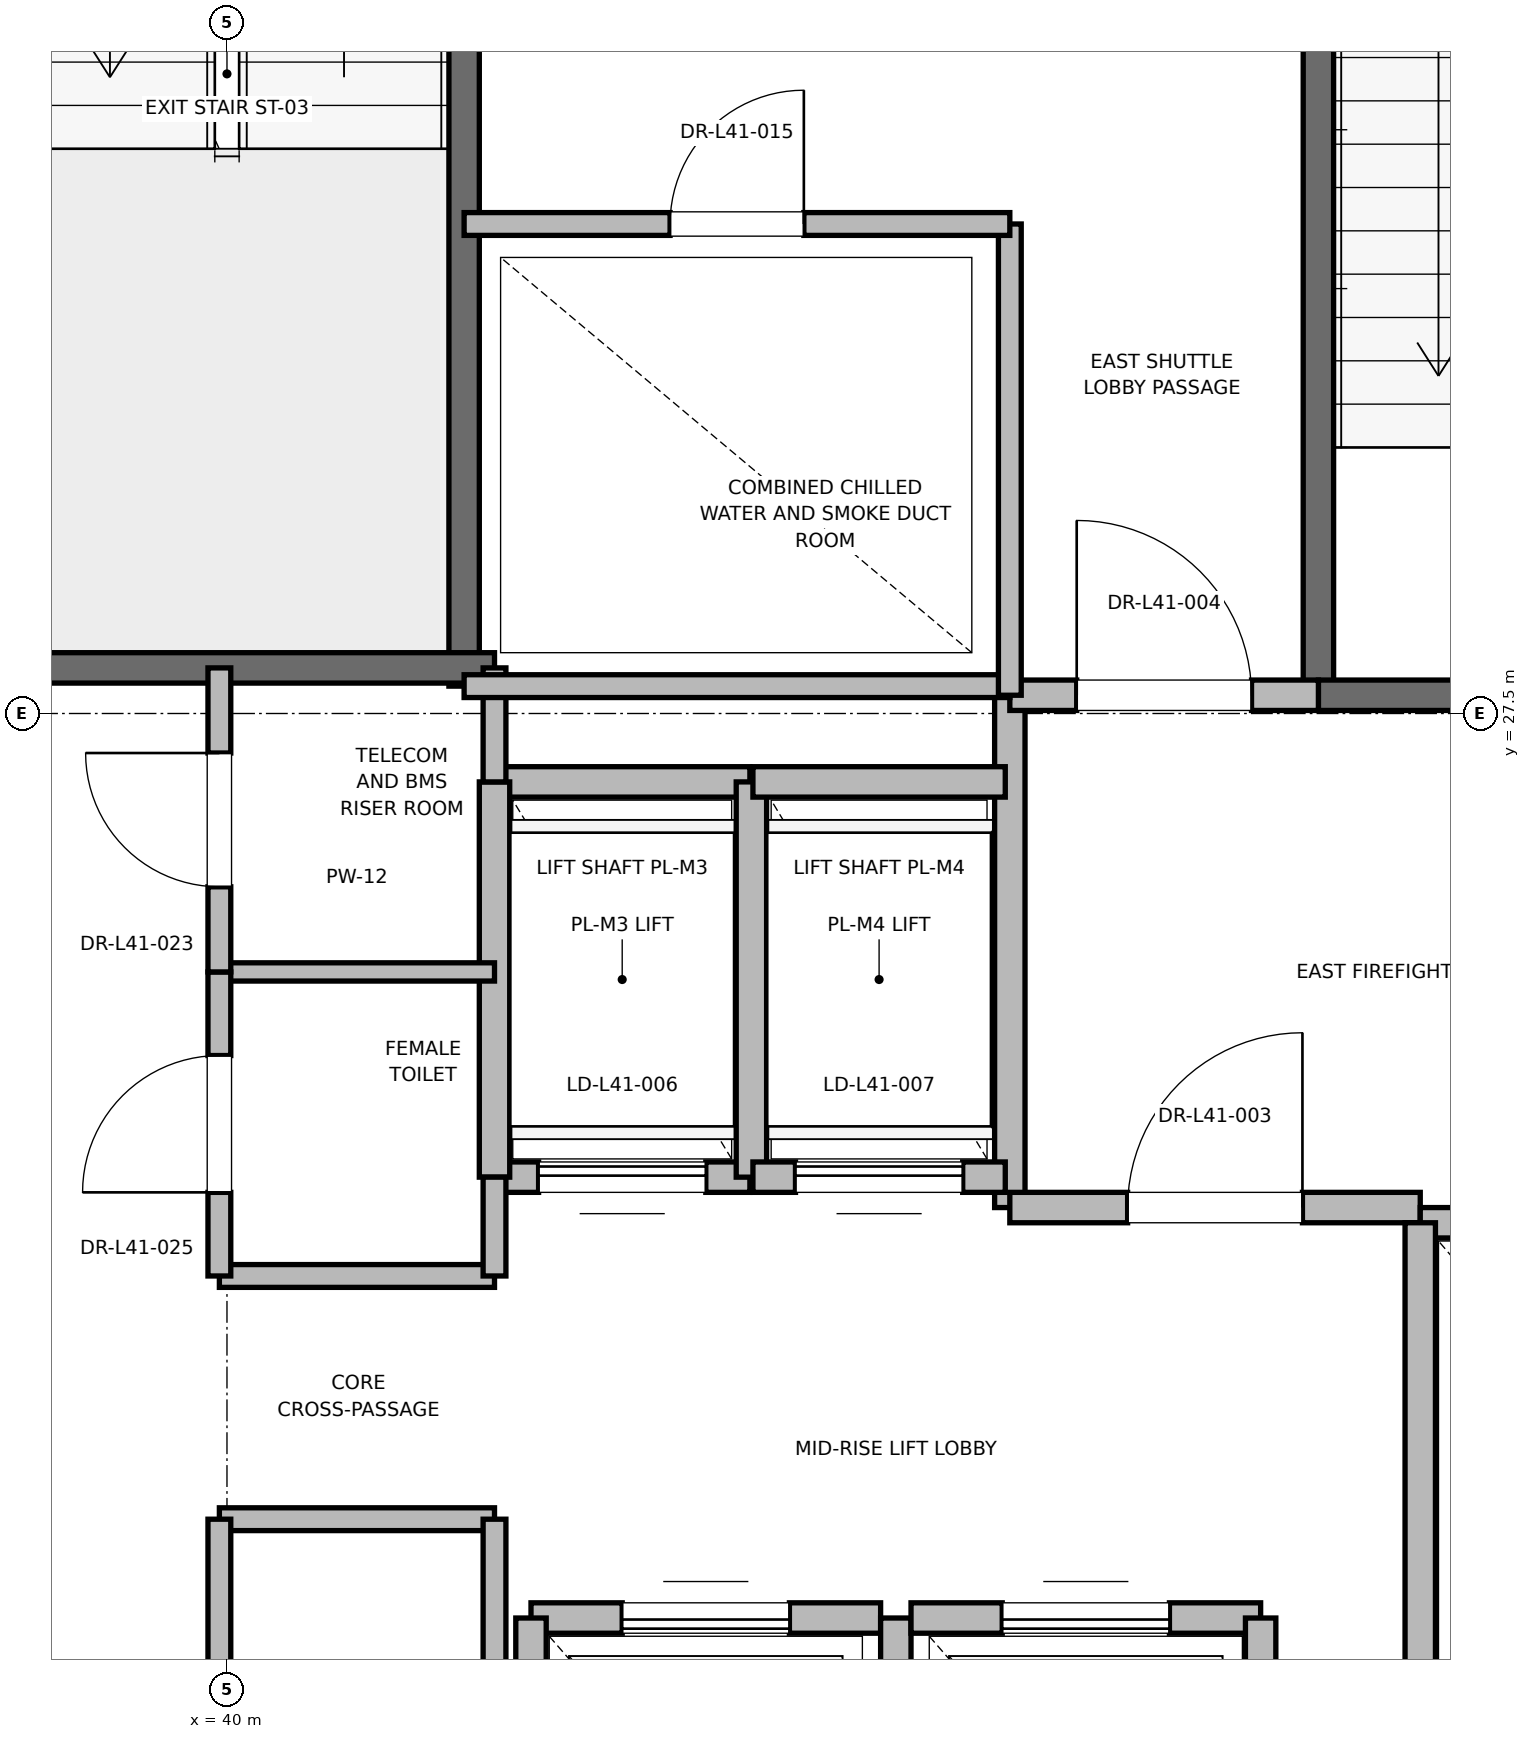
"""IFC4 building model, lengths in metres.
Left out: names, types, materials, properties, quantities, classifications, styles, units other than length and angle.
Written with IfcOpenShell. Run it as: python <this file> out.ifc"""

import sys

from ifc_helpers import new_model, si_unit, direction, frame, frame_2d, origin, place, context, subcontext, project, spatial, rectangle, extrude, element, fill, save


model = new_model("IFC4")
c1 = context("Model", 3, precision=1e-05, world=origin(), true_north=direction((0.0, 1.0)))
c2 = subcontext(c1, "Body", "Model", "MODEL_VIEW")
j1 = project(units=[si_unit("LENGTHUNIT", "METRE"), si_unit("PLANEANGLEUNIT", "RADIAN")], contexts=[c1])
p1 = place(None, origin())
s1 = spatial("IfcSite", under=j1, at=p1, CompositionType="ELEMENT")
p2 = place(p1, origin())
s2 = spatial("IfcBuilding", under=s1, at=p2, CompositionType="ELEMENT")
p3 = place(p2, frame((0.0, 0.0, 176.4)))
s3 = spatial("IfcBuildingStorey", under=s2, at=p3, CompositionType="ELEMENT", Elevation=176.4)
p4 = place(p3, frame((47.18, 27.62, 0.0), z_axis=(0.0, 0.0, 1.0), x_axis=(0.0, 1.0, 0.0)))
e1 = element("IfcWall", 1, at=p4, inside=s3, PredefinedType="SOLIDWALL", context=c2, shape_type="SweptSolid", body=[
    extrude(rectangle(XDim=8.18, YDim=0.2, at=frame_2d((4.09, 0.0))), origin(), (0.0, 0.0, 1.0), 3.775),
])
p5 = place(p3, frame((47.18, 27.62, 0.0), z_axis=(0.0, 0.0, 1.0), x_axis=(1.0, 0.0, 0.0)))
e2 = element("IfcWall", 2, at=p5, inside=s3, PredefinedType="SOLIDWALL", context=c2, shape_type="SweptSolid", body=[
    extrude(rectangle(XDim=3.12, YDim=0.2, at=frame_2d((1.56, 0.0))), origin(), (0.0, 0.0, 1.0), 3.775),
])
p6 = place(p5, frame((1.01, 0.0, 0.0)))
e3 = element("IfcOpeningElement", 3, at=p6, cuts=e2, PredefinedType="OPENING", context=c2, shape_type="SweptSolid", body=[
    extrude(rectangle(XDim=1.1, YDim=2.15, at=frame_2d((0.55, 1.075))), frame((0.0, 0.1, 0.0), z_axis=(0.0, -1.0, 0.0), x_axis=(1.0, 0.0, 0.0)), (0.0, 0.0, 1.0), 0.2),
])
p7 = place(p3, frame((41.56, 27.68, 0.0), z_axis=(0.0, 0.0, 1.0), x_axis=(0.0, 1.0, 0.0)))
e4 = element("IfcWall", 4, at=p7, inside=s3, PredefinedType="SOLIDWALL", context=c2, shape_type="SweptSolid", body=[
    extrude(rectangle(XDim=8.57, YDim=0.2, at=frame_2d((4.285, 0.0))), origin(), (0.0, 0.0, 1.0), 3.775),
])
p8 = place(p3, frame((38.44, 27.8, 0.0), z_axis=(0.0, 0.0, 1.0), x_axis=(1.0, 0.0, 0.0)))
e5 = element("IfcWall", 5, at=p8, inside=s3, PredefinedType="SOLIDWALL", context=c2, shape_type="SweptSolid", body=[
    extrude(rectangle(XDim=3.32, YDim=0.2, at=frame_2d((1.66, 0.0))), origin(), (0.0, 0.0, 1.0), 3.775),
])
p9 = place(p3, frame((45.15, 24.25, 0.0), z_axis=(0.0, 0.0, 1.0), x_axis=(0.0, 1.0, 0.0)))
e6 = element("IfcWall", 6, at=p9, inside=s3, PredefinedType="PARTITIONING", context=c2, shape_type="SweptSolid", body=[
    extrude(rectangle(XDim=3.37, YDim=0.2, at=frame_2d((1.685, 0.0))), origin(), (0.0, 0.0, 1.0), 3.775),
])
p10 = place(p3, frame((45.15, 24.25, 0.0), z_axis=(0.0, 0.0, 1.0), x_axis=(1.0, 0.0, 0.0)))
e7 = element("IfcWall", 7, at=p10, inside=s3, PredefinedType="PARTITIONING", context=c2, shape_type="SweptSolid", body=[
    extrude(rectangle(XDim=2.7, YDim=0.2, at=frame_2d((1.35, 0.0))), origin(), (0.0, 0.0, 1.0), 3.775),
])
p11 = place(p10, frame((0.775, 0.0, 0.0)))
e8 = element("IfcOpeningElement", 8, at=p11, cuts=e7, PredefinedType="OPENING", context=c2, shape_type="SweptSolid", body=[
    extrude(rectangle(XDim=1.15, YDim=2.2, at=frame_2d((0.575, 1.1))), frame((0.0, 0.1, 0.0), z_axis=(0.0, -1.0, 0.0), x_axis=(1.0, 0.0, 0.0)), (0.0, 0.0, 1.0), 0.2),
])
p12 = place(p3, frame((45.15, 27.62, 0.0), z_axis=(0.0, 0.0, 1.0), x_axis=(1.0, 0.0, 0.0)))
e9 = element("IfcWall", 9, at=p12, inside=s3, PredefinedType="PARTITIONING", context=c2, shape_type="SweptSolid", body=[
    extrude(rectangle(XDim=2.03, YDim=0.2, at=frame_2d((1.015, 0.0))), origin(), (0.0, 0.0, 1.0), 3.775),
])
p13 = place(p12, frame((0.44, 0.0, 0.0)))
e10 = element("IfcOpeningElement", 10, at=p13, cuts=e9, PredefinedType="OPENING", context=c2, shape_type="SweptSolid", body=[
    extrude(rectangle(XDim=1.15, YDim=2.2, at=frame_2d((0.575, 1.1))), frame((0.0, 0.1, 0.0), z_axis=(0.0, -1.0, 0.0), x_axis=(1.0, 0.0, 0.0)), (0.0, 0.0, 1.0), 0.2),
])
p14 = place(p3, frame((50.45, 24.15, 0.0), z_axis=(0.0, 0.0, 1.0), x_axis=(-1.0, 0.0, 0.0)))
e11 = element("IfcWall", 11, at=p14, inside=s3, PredefinedType="SOLIDWALL", context=c2, shape_type="SweptSolid", body=[
    extrude(rectangle(XDim=2.6, YDim=0.2, at=frame_2d((1.3, 0.0))), origin(), (0.0, 0.0, 1.0), 2.755),
])
p15 = place(p14, frame((0.75, 0.0, 0.0)))
e12 = element("IfcOpeningElement", 12, at=p15, cuts=e11, PredefinedType="OPENING", context=c2, shape_type="SweptSolid", body=[
    extrude(rectangle(XDim=1.1, YDim=2.2, at=frame_2d((0.55, 1.1))), frame((0.0, 0.1, 0.0), z_axis=(0.0, -1.0, 0.0), x_axis=(1.0, 0.0, 0.0)), (0.0, 0.0, 1.0), 0.2),
])
p16 = place(p3, frame((47.85, 24.15, 0.0), z_axis=(0.0, 0.0, 1.0), x_axis=(0.0, -1.0, 0.0)))
e13 = element("IfcWall", 13, at=p16, inside=s3, PredefinedType="SOLIDWALL", context=c2, shape_type="SweptSolid", body=[
    extrude(rectangle(XDim=3.0, YDim=0.2, at=frame_2d((1.5, 0.0))), origin(), (0.0, 0.0, 1.0), 3.775),
])
p17 = place(p3, frame((44.3, 21.55, 0.0), z_axis=(0.0, 0.0, 1.0), x_axis=(-1.0, 0.0, 0.0)))
e14 = element("IfcWall", 14, at=p17, inside=s3, PredefinedType="SOLIDWALL", context=c2, shape_type="SweptSolid", body=[
    extrude(rectangle(XDim=2.3, YDim=0.2, at=frame_2d((1.15, 0.0))), origin(), (0.0, 0.0, 1.0), 3.775),
])
p18 = place(p17, frame((0.6, 0.0, 0.0)))
e15 = element("IfcOpeningElement", 15, at=p18, cuts=e14, PredefinedType="OPENING", context=c2, shape_type="SweptSolid", body=[
    extrude(rectangle(XDim=1.1, YDim=2.2, at=frame_2d((0.55, 1.1))), frame((0.0, 0.1, 0.0), z_axis=(0.0, -1.0, 0.0), x_axis=(1.0, 0.0, 0.0)), (0.0, 0.0, 1.0), 0.2),
])
p19 = place(p3, frame((42.0, 21.55, 0.0), z_axis=(0.0, 0.0, 1.0), x_axis=(0.0, -1.0, 0.0)))
e16 = element("IfcWall", 16, at=p19, inside=s3, PredefinedType="SOLIDWALL", context=c2, shape_type="SweptSolid", body=[
    extrude(rectangle(XDim=2.6, YDim=0.2, at=frame_2d((1.3, 0.0))), origin(), (0.0, 0.0, 1.0), 2.755),
])
p20 = place(p3, frame((44.4, 18.95, 0.0), z_axis=(0.0, 0.0, 1.0), x_axis=(0.0, 1.0, 0.0)))
e17 = element("IfcWall", 17, at=p20, inside=s3, PredefinedType="SOLIDWALL", context=c2, shape_type="SweptSolid", body=[
    extrude(rectangle(XDim=2.6, YDim=0.2, at=frame_2d((1.3, 0.0))), origin(), (0.0, 0.0, 1.0), 3.775),
])
p21 = place(p3, frame((46.8, 21.55, 0.0), z_axis=(0.0, 0.0, 1.0), x_axis=(-1.0, 0.0, 0.0)))
e18 = element("IfcWall", 18, at=p21, inside=s3, PredefinedType="SOLIDWALL", context=c2, shape_type="SweptSolid", body=[
    extrude(rectangle(XDim=2.3, YDim=0.2, at=frame_2d((1.15, 0.0))), origin(), (0.0, 0.0, 1.0), 3.775),
])
p22 = place(p21, frame((0.6, 0.0, 0.0)))
e19 = element("IfcOpeningElement", 19, at=p22, cuts=e18, PredefinedType="OPENING", context=c2, shape_type="SweptSolid", body=[
    extrude(rectangle(XDim=1.1, YDim=2.2, at=frame_2d((0.55, 1.1))), frame((0.0, 0.1, 0.0), z_axis=(0.0, -1.0, 0.0), x_axis=(1.0, 0.0, 0.0)), (0.0, 0.0, 1.0), 0.2),
])
p23 = place(p3, frame((46.8, 18.95, 0.0), z_axis=(0.0, 0.0, 1.0), x_axis=(0.0, 1.0, 0.0)))
e20 = element("IfcWall", 20, at=p23, inside=s3, PredefinedType="SOLIDWALL", context=c2, shape_type="SweptSolid", body=[
    extrude(rectangle(XDim=2.6, YDim=0.2, at=frame_2d((1.3, 0.0))), origin(), (0.0, 0.0, 1.0), 3.775),
])
p24 = place(p3, frame((41.76, 24.45, 0.0), z_axis=(0.0, 0.0, 1.0), x_axis=(1.0, 0.0, 0.0)))
e21 = element("IfcWall", 21, at=p24, inside=s3, PredefinedType="SOLIDWALL", context=c2, shape_type="SweptSolid", body=[
    extrude(rectangle(XDim=1.68, YDim=0.2, at=frame_2d((0.84, 0.0))), origin(), (0.0, 0.0, 1.0), 3.775),
])
p25 = place(p24, frame((0.29, 0.0, 0.0)))
e22 = element("IfcOpeningElement", 22, at=p25, cuts=e21, PredefinedType="OPENING", context=c2, shape_type="SweptSolid", body=[
    extrude(rectangle(XDim=1.1, YDim=2.2, at=frame_2d((0.55, 1.1))), frame((0.0, 0.1, 0.0), z_axis=(0.0, -1.0, 0.0), x_axis=(1.0, 0.0, 0.0)), (0.0, 0.0, 1.0), 0.2),
])
p26 = place(p3, frame((43.44, 27.05, 0.0), z_axis=(0.0, 0.0, 1.0), x_axis=(-1.0, 0.0, 0.0)))
e23 = element("IfcWall", 23, at=p26, inside=s3, PredefinedType="SOLIDWALL", context=c2, shape_type="SweptSolid", body=[
    extrude(rectangle(XDim=1.68, YDim=0.2, at=frame_2d((0.84, 0.0))), origin(), (0.0, 0.0, 1.0), 3.775),
])
for number, where, z_axis, x_axis in (
    (24, (41.76, 27.05, 0.0), (0.0, 0.0, 1.0), (0.0, -1.0, 0.0)),
    (25, (43.45, 24.45, 0.0), (0.0, 0.0, 1.0), (0.0, 1.0, 0.0)),
):
    element("IfcWall", number, at=place(p3, frame(where, z_axis=z_axis, x_axis=x_axis)), inside=s3, PredefinedType="SOLIDWALL", context=c2, shape_type="SweptSolid", body=[
        extrude(rectangle(XDim=2.6, YDim=0.2, at=frame_2d((1.3, 0.0))), origin(), (0.0, 0.0, 1.0), 3.775),
    ])
p27 = place(p3, frame((43.46, 24.45, 0.0), z_axis=(0.0, 0.0, 1.0), x_axis=(1.0, 0.0, 0.0)))
e26 = element("IfcWall", 26, at=p27, inside=s3, PredefinedType="SOLIDWALL", context=c2, shape_type="SweptSolid", body=[
    extrude(rectangle(XDim=1.66, YDim=0.2, at=frame_2d((0.83, 0.0))), origin(), (0.0, 0.0, 1.0), 3.775),
])
p28 = place(p27, frame((0.28, 0.0, 0.0)))
e27 = element("IfcOpeningElement", 27, at=p28, cuts=e26, PredefinedType="OPENING", context=c2, shape_type="SweptSolid", body=[
    extrude(rectangle(XDim=1.1, YDim=2.2, at=frame_2d((0.55, 1.1))), frame((0.0, 0.1, 0.0), z_axis=(0.0, -1.0, 0.0), x_axis=(1.0, 0.0, 0.0)), (0.0, 0.0, 1.0), 0.2),
])
p29 = place(p3, frame((45.12, 27.05, 0.0), z_axis=(0.0, 0.0, 1.0), x_axis=(-1.0, 0.0, 0.0)))
e28 = element("IfcWall", 28, at=p29, inside=s3, PredefinedType="SOLIDWALL", context=c2, shape_type="SweptSolid", body=[
    extrude(rectangle(XDim=1.66, YDim=0.2, at=frame_2d((0.83, 0.0))), origin(), (0.0, 0.0, 1.0), 3.775),
])
for number, where, z_axis, x_axis in (
    (29, (39.95, 22.2, 0.0), (0.0, 0.0, 1.0), (1.0, 0.0, 0.0)),
    (30, (39.95, 23.8, 0.0), (0.0, 0.0, 1.0), (1.0, 0.0, 0.0)),
):
    element("IfcWall", number, at=place(p3, frame(where, z_axis=z_axis, x_axis=x_axis)), inside=s3, PredefinedType="PARTITIONING", context=c2, shape_type="SweptSolid", body=[
        extrude(rectangle(XDim=1.81, YDim=0.15, at=frame_2d((0.905, 0.0))), origin(), (0.0, 0.0, 1.0), 2.85),
    ])
p30 = place(p3, frame((39.95, 25.8, 0.0), z_axis=(0.0, 0.0, 1.0), x_axis=(1.0, 0.0, 0.0)))
e31 = element("IfcWall", 31, at=p30, inside=s3, PredefinedType="PARTITIONING", context=c2, shape_type="SweptSolid", body=[
    extrude(rectangle(XDim=1.81, YDim=0.12, at=frame_2d((0.905, 0.0))), origin(), (0.0, 0.0, 1.0), 2.85),
])
p31 = place(p3, frame((41.76, 18.6, 0.0), z_axis=(0.0, 0.0, 1.0), x_axis=(0.0, 1.0, 0.0)))
e32 = element("IfcWall", 32, at=p31, inside=s3, PredefinedType="PARTITIONING", context=c2, shape_type="SweptSolid", body=[
    extrude(rectangle(XDim=3.6, YDim=0.15, at=frame_2d((1.8, 0.0))), origin(), (0.0, 0.0, 1.0), 2.755),
])
p32 = place(p3, frame((41.76, 23.8, 0.0), z_axis=(0.0, 0.0, 1.0), x_axis=(0.0, 1.0, 0.0)))
e33 = element("IfcWall", 33, at=p32, inside=s3, PredefinedType="PARTITIONING", context=c2, shape_type="SweptSolid", body=[
    extrude(rectangle(XDim=0.65, YDim=0.15, at=frame_2d((0.325, 0.0))), origin(), (0.0, 0.0, 1.0), 2.85),
])
p33 = place(p3, frame((41.76, 27.05, 0.0), z_axis=(0.0, 0.0, 1.0), x_axis=(0.0, 1.0, 0.0)))
e34 = element("IfcWall", 34, at=p33, inside=s3, PredefinedType="PARTITIONING", context=c2, shape_type="SweptSolid", body=[
    extrude(rectangle(XDim=0.75, YDim=0.15, at=frame_2d((0.375, 0.0))), origin(), (0.0, 0.0, 1.0), 2.85),
])
p34 = place(p3, frame((39.95, 19.2, 0.0), z_axis=(0.0, 0.0, 1.0), x_axis=(0.0, 1.0, 0.0)))
e35 = element("IfcWall", 35, at=p34, inside=s3, PredefinedType="PARTITIONING", context=c2, shape_type="SweptSolid", body=[
    extrude(rectangle(XDim=3.0, YDim=0.15, at=frame_2d((1.5, 0.0))), origin(), (0.0, 0.0, 1.0), 2.85),
])
p35 = place(p34, frame((1.05, 0.0, 0.0)))
e36 = element("IfcOpeningElement", 36, at=p35, cuts=e35, PredefinedType="OPENING", context=c2, shape_type="SweptSolid", body=[
    extrude(rectangle(XDim=0.9, YDim=2.1, at=frame_2d((0.45, 1.05))), frame((0.0, 0.075, 0.0), z_axis=(0.0, -1.0, 0.0), x_axis=(1.0, 0.0, 0.0)), (0.0, 0.0, 1.0), 0.15),
])
p36 = place(p3, frame((39.95, 23.8, 0.0), z_axis=(0.0, 0.0, 1.0), x_axis=(0.0, 1.0, 0.0)))
e37 = element("IfcWall", 37, at=p36, inside=s3, PredefinedType="PARTITIONING", context=c2, shape_type="SweptSolid", body=[
    extrude(rectangle(XDim=2.0, YDim=0.15, at=frame_2d((1.0, 0.0))), origin(), (0.0, 0.0, 1.0), 2.85),
])
p37 = place(p36, frame((0.55, 0.0, 0.0)))
e38 = element("IfcOpeningElement", 38, at=p37, cuts=e37, PredefinedType="OPENING", context=c2, shape_type="SweptSolid", body=[
    extrude(rectangle(XDim=0.9, YDim=2.1, at=frame_2d((0.45, 1.05))), frame((0.0, 0.075, 0.0), z_axis=(0.0, -1.0, 0.0), x_axis=(1.0, 0.0, 0.0)), (0.0, 0.0, 1.0), 0.15),
])
p38 = place(p3, frame((39.95, 25.8, 0.0), z_axis=(0.0, 0.0, 1.0), x_axis=(0.0, 1.0, 0.0)))
e39 = element("IfcWall", 39, at=p38, inside=s3, PredefinedType="PARTITIONING", context=c2, shape_type="SweptSolid", body=[
    extrude(rectangle(XDim=2.0, YDim=0.15, at=frame_2d((1.0, 0.0))), origin(), (0.0, 0.0, 1.0), 2.85),
])
p39 = place(p38, frame((0.56, 0.0, 0.0)))
e40 = element("IfcOpeningElement", 40, at=p39, cuts=e39, PredefinedType="OPENING", context=c2, shape_type="SweptSolid", body=[
    extrude(rectangle(XDim=0.88, YDim=2.1, at=frame_2d((0.44, 1.05))), frame((0.0, 0.075, 0.0), z_axis=(0.0, -1.0, 0.0), x_axis=(1.0, 0.0, 0.0)), (0.0, 0.0, 1.0), 0.15),
])
p40 = place(p3, frame((41.56, 27.68, 0.0), z_axis=(0.0, 0.0, 1.0), x_axis=(1.0, 0.0, 0.0)))
e41 = element("IfcWall", 41, at=p40, inside=s3, PredefinedType="PARTITIONING", context=c2, shape_type="SweptSolid", body=[
    extrude(rectangle(XDim=3.59, YDim=0.15, at=frame_2d((1.795, 0.0))), origin(), (0.0, 0.0, 1.0), 2.85),
])
p41 = place(p3, frame((45.15, 27.62, 0.0), z_axis=(0.0, 0.0, 1.0), x_axis=(0.0, 1.0, 0.0)))
e42 = element("IfcWall", 42, at=p41, inside=s3, PredefinedType="PARTITIONING", context=c2, shape_type="SweptSolid", body=[
    extrude(rectangle(XDim=3.1, YDim=0.15, at=frame_2d((1.55, 0.0))), origin(), (0.0, 0.0, 1.0), 2.85),
])
p42 = place(p3, frame((41.56, 30.72, 0.0), z_axis=(0.0, 0.0, 1.0), x_axis=(1.0, 0.0, 0.0)))
e43 = element("IfcWall", 43, at=p42, inside=s3, PredefinedType="PARTITIONING", context=c2, shape_type="SweptSolid", body=[
    extrude(rectangle(XDim=3.59, YDim=0.15, at=frame_2d((1.795, 0.0))), origin(), (0.0, 0.0, 1.0), 2.85),
])
p43 = place(p42, frame((1.355, 0.0, 0.0)))
e44 = element("IfcOpeningElement", 44, at=p43, cuts=e43, PredefinedType="OPENING", context=c2, shape_type="SweptSolid", body=[
    extrude(rectangle(XDim=0.88, YDim=2.1, at=frame_2d((0.44, 1.05))), frame((0.0, 0.075, 0.0), z_axis=(0.0, -1.0, 0.0), x_axis=(1.0, 0.0, 0.0)), (0.0, 0.0, 1.0), 0.15),
])
p44 = place(p11, origin())
e45 = element("IfcDoor", 45, at=p44, inside=s3, OperationType="SINGLE_SWING_RIGHT", PredefinedType="DOOR", context=c2, shape_type="SweptSolid", body=[
    extrude(rectangle(XDim=1.15, YDim=2.2, at=frame_2d((0.575, 1.1))), frame((0.0, 0.025, 0.0), z_axis=(0.0, -1.0, 0.0), x_axis=(1.0, 0.0, 0.0)), (0.0, 0.0, 1.0), 0.05),
])
fill(e8, e45)
p45 = place(p13, origin())
e46 = element("IfcDoor", 46, at=p45, inside=s3, OperationType="SINGLE_SWING_LEFT", PredefinedType="DOOR", context=c2, shape_type="SweptSolid", body=[
    extrude(rectangle(XDim=1.15, YDim=2.2, at=frame_2d((0.575, 1.1))), frame((0.0, 0.025, 0.0), z_axis=(0.0, -1.0, 0.0), x_axis=(1.0, 0.0, 0.0)), (0.0, 0.0, 1.0), 0.05),
])
fill(e10, e46)
p46 = place(p18, origin())
e47 = element("IfcDoor", 47, at=p46, inside=s3, OperationType="SLIDING_TO_RIGHT", PredefinedType="DOOR", context=c2, shape_type="SweptSolid", body=[
    extrude(rectangle(XDim=1.1, YDim=2.2, at=frame_2d((0.55, 1.1))), frame((0.0, 0.025, 0.0), z_axis=(0.0, -1.0, 0.0), x_axis=(1.0, 0.0, 0.0)), (0.0, 0.0, 1.0), 0.05),
])
fill(e15, e47)
p47 = place(p22, origin())
e48 = element("IfcDoor", 48, at=p47, inside=s3, OperationType="SLIDING_TO_RIGHT", PredefinedType="DOOR", context=c2, shape_type="SweptSolid", body=[
    extrude(rectangle(XDim=1.1, YDim=2.2, at=frame_2d((0.55, 1.1))), frame((0.0, 0.025, 0.0), z_axis=(0.0, -1.0, 0.0), x_axis=(1.0, 0.0, 0.0)), (0.0, 0.0, 1.0), 0.05),
])
fill(e19, e48)
p48 = place(p25, origin())
e49 = element("IfcDoor", 49, at=p48, inside=s3, OperationType="SLIDING_TO_RIGHT", PredefinedType="DOOR", context=c2, shape_type="SweptSolid", body=[
    extrude(rectangle(XDim=1.1, YDim=2.2, at=frame_2d((0.55, 1.1))), frame((0.0, 0.025, 0.0), z_axis=(0.0, -1.0, 0.0), x_axis=(1.0, 0.0, 0.0)), (0.0, 0.0, 1.0), 0.05),
])
fill(e22, e49)
p49 = place(p28, origin())
e50 = element("IfcDoor", 50, at=p49, inside=s3, OperationType="SLIDING_TO_RIGHT", PredefinedType="DOOR", context=c2, shape_type="SweptSolid", body=[
    extrude(rectangle(XDim=1.1, YDim=2.2, at=frame_2d((0.55, 1.1))), frame((0.0, 0.025, 0.0), z_axis=(0.0, -1.0, 0.0), x_axis=(1.0, 0.0, 0.0)), (0.0, 0.0, 1.0), 0.05),
])
fill(e27, e50)
p50 = place(p37, origin())
e51 = element("IfcDoor", 51, at=p50, inside=s3, OperationType="SINGLE_SWING_LEFT", PredefinedType="DOOR", context=c2, shape_type="SweptSolid", body=[
    extrude(rectangle(XDim=0.9, YDim=2.1, at=frame_2d((0.45, 1.05))), frame((0.0, 0.025, 0.0), z_axis=(0.0, -1.0, 0.0), x_axis=(1.0, 0.0, 0.0)), (0.0, 0.0, 1.0), 0.05),
])
fill(e38, e51)
p51 = place(p39, origin())
e52 = element("IfcDoor", 52, at=p51, inside=s3, OperationType="SINGLE_SWING_RIGHT", PredefinedType="DOOR", context=c2, shape_type="SweptSolid", body=[
    extrude(rectangle(XDim=0.88, YDim=2.1, at=frame_2d((0.44, 1.05))), frame((0.0, 0.025, 0.0), z_axis=(0.0, -1.0, 0.0), x_axis=(1.0, 0.0, 0.0)), (0.0, 0.0, 1.0), 0.05),
])
fill(e40, e52)
p52 = place(p43, origin())
e53 = element("IfcDoor", 53, at=p52, inside=s3, OperationType="SINGLE_SWING_RIGHT", PredefinedType="DOOR", context=c2, shape_type="SweptSolid", body=[
    extrude(rectangle(XDim=0.88, YDim=2.1, at=frame_2d((0.44, 1.05))), frame((0.0, 0.025, 0.0), z_axis=(0.0, -1.0, 0.0), x_axis=(1.0, 0.0, 0.0)), (0.0, 0.0, 1.0), 0.05),
])
fill(e44, e53)
save(model, sys.argv[1])
